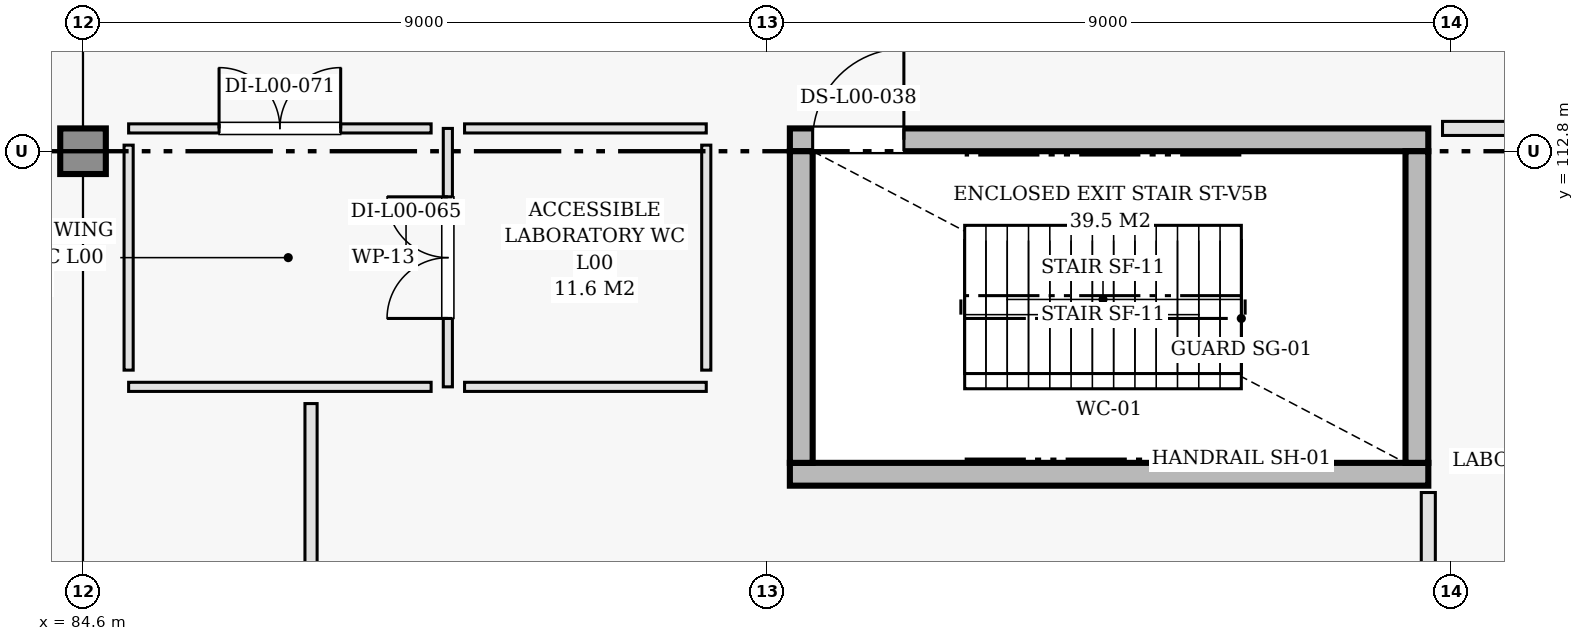
"""IFC4 building model, lengths in metres.
Left out: names, types, materials, properties, quantities, classifications, styles, units other than length and angle.
Written with IfcOpenShell. Run it as: python <this file> out.ifc"""

import sys

from ifc_helpers import new_model, si_unit, direction, frame, frame_2d, origin, origin_2d, place, context, subcontext, project, spatial, rectangle, extrude, element, fill, save


model = new_model("IFC4")
c1 = context("Model", 3, precision=1e-05, world=origin(), true_north=direction((0.0, 1.0)))
c2 = subcontext(c1, "Body", "Model", "MODEL_VIEW")
j1 = project(units=[si_unit("LENGTHUNIT", "METRE"), si_unit("PLANEANGLEUNIT", "RADIAN")], contexts=[c1])
p1 = place(None, origin())
s1 = spatial("IfcSite", under=j1, at=p1, CompositionType="ELEMENT")
p2 = place(p1, origin())
s2 = spatial("IfcBuilding", under=s1, at=p2, CompositionType="ELEMENT")
p3 = place(p2, origin())
s3 = spatial("IfcBuildingStorey", under=s2, at=p3, CompositionType="ELEMENT", Elevation=0.0)
p4 = place(p3, frame((84.6, 112.8, 0.0), z_axis=(0.0, 0.0, 1.0), x_axis=(1.0, 0.0, 0.0)))
e1 = element("IfcColumn", 1, at=p4, inside=s3, PredefinedType="COLUMN", context=c2, shape_type="SweptSolid", body=[
    extrude(rectangle(XDim=0.6, YDim=0.6, at=origin_2d()), origin(), (0.0, 0.0, 1.0), 4.8),
])
p5 = place(p3, frame((93.9, 108.55, 0.0), z_axis=(0.0, 0.0, 1.0), x_axis=(1.0, 0.0, 0.0)))
e2 = element("IfcWall", 2, at=p5, inside=s3, PredefinedType="SHEAR", context=c2, shape_type="SweptSolid", body=[
    extrude(rectangle(XDim=8.4, YDim=0.3, at=frame_2d((4.2, 0.0))), origin(), (0.0, 0.0, 1.0), 4.52),
])
p6 = place(p3, frame((93.9, 112.95, 0.0), z_axis=(0.0, 0.0, 1.0), x_axis=(1.0, 0.0, 0.0)))
e3 = element("IfcWall", 3, at=p6, inside=s3, PredefinedType="SHEAR", context=c2, shape_type="SweptSolid", body=[
    extrude(rectangle(XDim=8.4, YDim=0.3, at=frame_2d((4.2, 0.0))), origin(), (0.0, 0.0, 1.0), 4.52),
])
p7 = place(p6, frame((0.3, 0.0, 0.0)))
e4 = element("IfcOpeningElement", 4, at=p7, cuts=e3, PredefinedType="OPENING", context=c2, shape_type="SweptSolid", body=[
    extrude(rectangle(XDim=1.2, YDim=2.15, at=frame_2d((0.6, 1.075))), frame((0.0, 0.16, 0.0), z_axis=(0.0, -1.0, 0.0), x_axis=(1.0, 0.0, 0.0)), (0.0, 0.0, 1.0), 0.32),
])
for number, where, z_axis, x_axis in (
    (5, (94.05, 108.7, 0.0), (0.0, 0.0, 1.0), (0.0, 1.0, 0.0)),
    (6, (102.15, 108.7, 0.0), (0.0, 0.0, 1.0), (0.0, 1.0, 0.0)),
):
    element("IfcWall", number, at=place(p3, frame(where, z_axis=z_axis, x_axis=x_axis)), inside=s3, PredefinedType="SHEAR", context=c2, shape_type="SweptSolid", body=[
        extrude(rectangle(XDim=4.1, YDim=0.3, at=frame_2d((2.05, 0.0))), origin(), (0.0, 0.0, 1.0), 4.52),
    ])
p8 = place(p3, frame((89.4, 109.7, 0.0), z_axis=(0.0, 0.0, 1.0), x_axis=(0.0, 1.0, 0.0)))
e7 = element("IfcWall", 7, at=p8, inside=s3, PredefinedType="PARTITIONING", context=c2, shape_type="SweptSolid", body=[
    extrude(rectangle(XDim=3.4, YDim=0.12, at=frame_2d((1.7, 0.0))), origin(), (0.0, 0.0, 1.0), 4.025),
])
p9 = place(p8, frame((0.9, 0.0, 0.0)))
e8 = element("IfcOpeningElement", 8, at=p9, cuts=e7, PredefinedType="OPENING", context=c2, shape_type="SweptSolid", body=[
    extrude(rectangle(XDim=1.6, YDim=2.2, at=frame_2d((0.8, 1.1))), frame((0.0, 0.07, 0.0), z_axis=(0.0, -1.0, 0.0), x_axis=(1.0, 0.0, 0.0)), (0.0, 0.0, 1.0), 0.14),
])
p10 = place(p3, frame((89.62, 109.7, 0.0), z_axis=(0.0, 0.0, 1.0), x_axis=(1.0, 0.0, 0.0)))
e9 = element("IfcWall", 9, at=p10, inside=s3, PredefinedType="PARTITIONING", context=c2, shape_type="SweptSolid", body=[
    extrude(rectangle(XDim=3.18, YDim=0.12, at=frame_2d((1.59, 0.0))), origin(), (0.0, 0.0, 1.0), 4.025),
])
p11 = place(p3, frame((89.62, 113.1, 0.0), z_axis=(0.0, 0.0, 1.0), x_axis=(1.0, 0.0, 0.0)))
e10 = element("IfcWall", 10, at=p11, inside=s3, PredefinedType="PARTITIONING", context=c2, shape_type="SweptSolid", body=[
    extrude(rectangle(XDim=3.18, YDim=0.12, at=frame_2d((1.59, 0.0))), origin(), (0.0, 0.0, 1.0), 4.52),
])
p12 = place(p3, frame((92.8, 109.92, 0.0), z_axis=(0.0, 0.0, 1.0), x_axis=(0.0, 1.0, 0.0)))
e11 = element("IfcWall", 11, at=p12, inside=s3, PredefinedType="PARTITIONING", context=c2, shape_type="SweptSolid", body=[
    extrude(rectangle(XDim=2.96, YDim=0.12, at=frame_2d((1.48, 0.0))), origin(), (0.0, 0.0, 1.0), 4.52),
])
p13 = place(p3, frame((85.2, 113.1, 0.0), z_axis=(0.0, 0.0, 1.0), x_axis=(1.0, 0.0, 0.0)))
e12 = element("IfcWall", 12, at=p13, inside=s3, PredefinedType="PARTITIONING", context=c2, shape_type="SweptSolid", body=[
    extrude(rectangle(XDim=3.98, YDim=0.12, at=frame_2d((1.99, 0.0))), origin(), (0.0, 0.0, 1.0), 4.52),
])
p14 = place(p13, frame((1.19, 0.0, 0.0)))
e13 = element("IfcOpeningElement", 13, at=p14, cuts=e12, PredefinedType="OPENING", context=c2, shape_type="SweptSolid", body=[
    extrude(rectangle(XDim=1.6, YDim=2.2, at=frame_2d((0.8, 1.1))), frame((0.0, 0.07, 0.0), z_axis=(0.0, -1.0, 0.0), x_axis=(1.0, 0.0, 0.0)), (0.0, 0.0, 1.0), 0.14),
])
p15 = place(p3, frame((85.2, 109.7, 0.0), z_axis=(0.0, 0.0, 1.0), x_axis=(1.0, 0.0, 0.0)))
e14 = element("IfcWall", 14, at=p15, inside=s3, PredefinedType="PARTITIONING", context=c2, shape_type="SweptSolid", body=[
    extrude(rectangle(XDim=3.98, YDim=0.12, at=frame_2d((1.99, 0.0))), origin(), (0.0, 0.0, 1.0), 4.025),
])
p16 = place(p3, frame((85.2, 109.92, 0.0), z_axis=(0.0, 0.0, 1.0), x_axis=(0.0, 1.0, 0.0)))
e15 = element("IfcWall", 15, at=p16, inside=s3, PredefinedType="PARTITIONING", context=c2, shape_type="SweptSolid", body=[
    extrude(rectangle(XDim=2.96, YDim=0.12, at=frame_2d((1.48, 0.0))), origin(), (0.0, 0.0, 1.0), 4.52),
])
p17 = place(p3, frame((102.487, 113.1, 0.0), z_axis=(0.0, 0.0, 1.0), x_axis=(1.0, 0.0, 0.0)))
e16 = element("IfcWall", 16, at=p17, inside=s3, PredefinedType="PARTITIONING", context=c2, shape_type="SweptSolid", body=[
    extrude(rectangle(XDim=12.967, YDim=0.185, at=frame_2d((6.483, 0.0))), origin(), (0.0, 0.0, 1.0), 3.605),
])
p18 = place(p3, frame((102.3, 103.855, 0.0), z_axis=(0.0, 0.0, 1.0), x_axis=(0.0, 1.0, 0.0)))
e17 = element("IfcWall", 17, at=p18, inside=s3, PredefinedType="PARTITIONING", context=c2, shape_type="SweptSolid", body=[
    extrude(rectangle(XDim=4.455, YDim=0.185, at=frame_2d((2.228, 0.0))), origin(), (0.0, 0.0, 1.0), 3.605),
])
p19 = place(p3, frame((87.6, 103.855, 0.0), z_axis=(0.0, 0.0, 1.0), x_axis=(0.0, 1.0, 0.0)))
e18 = element("IfcWall", 18, at=p19, inside=s3, PredefinedType="PARTITIONING", context=c2, shape_type="SweptSolid", body=[
    extrude(rectangle(XDim=5.625, YDim=0.16, at=frame_2d((2.812, 0.0))), origin(), (0.0, 0.0, 1.0), 3.755),
])
p20 = place(p7, origin())
e19 = element("IfcDoor", 19, at=p20, inside=s3, OperationType="SINGLE_SWING_RIGHT", PredefinedType="DOOR", context=c2, shape_type="SweptSolid", body=[
    extrude(rectangle(XDim=1.2, YDim=2.15, at=frame_2d((0.6, 1.075))), frame((0.0, 0.025, 0.0), z_axis=(0.0, -1.0, 0.0), x_axis=(1.0, 0.0, 0.0)), (0.0, 0.0, 1.0), 0.05),
])
fill(e4, e19)
p21 = place(p9, origin())
e20 = element("IfcDoor", 20, at=p21, inside=s3, OperationType="DOUBLE_DOOR_SINGLE_SWING", PredefinedType="DOOR", context=c2, shape_type="SweptSolid", body=[
    extrude(rectangle(XDim=1.6, YDim=2.2, at=frame_2d((0.8, 1.1))), frame((0.0, 0.025, 0.0), z_axis=(0.0, -1.0, 0.0), x_axis=(1.0, 0.0, 0.0)), (0.0, 0.0, 1.0), 0.05),
])
fill(e8, e20)
p22 = place(p14, origin())
e21 = element("IfcDoor", 21, at=p22, inside=s3, OperationType="DOUBLE_DOOR_SINGLE_SWING", PredefinedType="DOOR", context=c2, shape_type="SweptSolid", body=[
    extrude(rectangle(XDim=1.6, YDim=2.2, at=frame_2d((0.8, 1.1))), frame((0.0, 0.025, 0.0), z_axis=(0.0, -1.0, 0.0), x_axis=(1.0, 0.0, 0.0)), (0.0, 0.0, 1.0), 0.05),
])
fill(e13, e21)
save(model, sys.argv[1])
